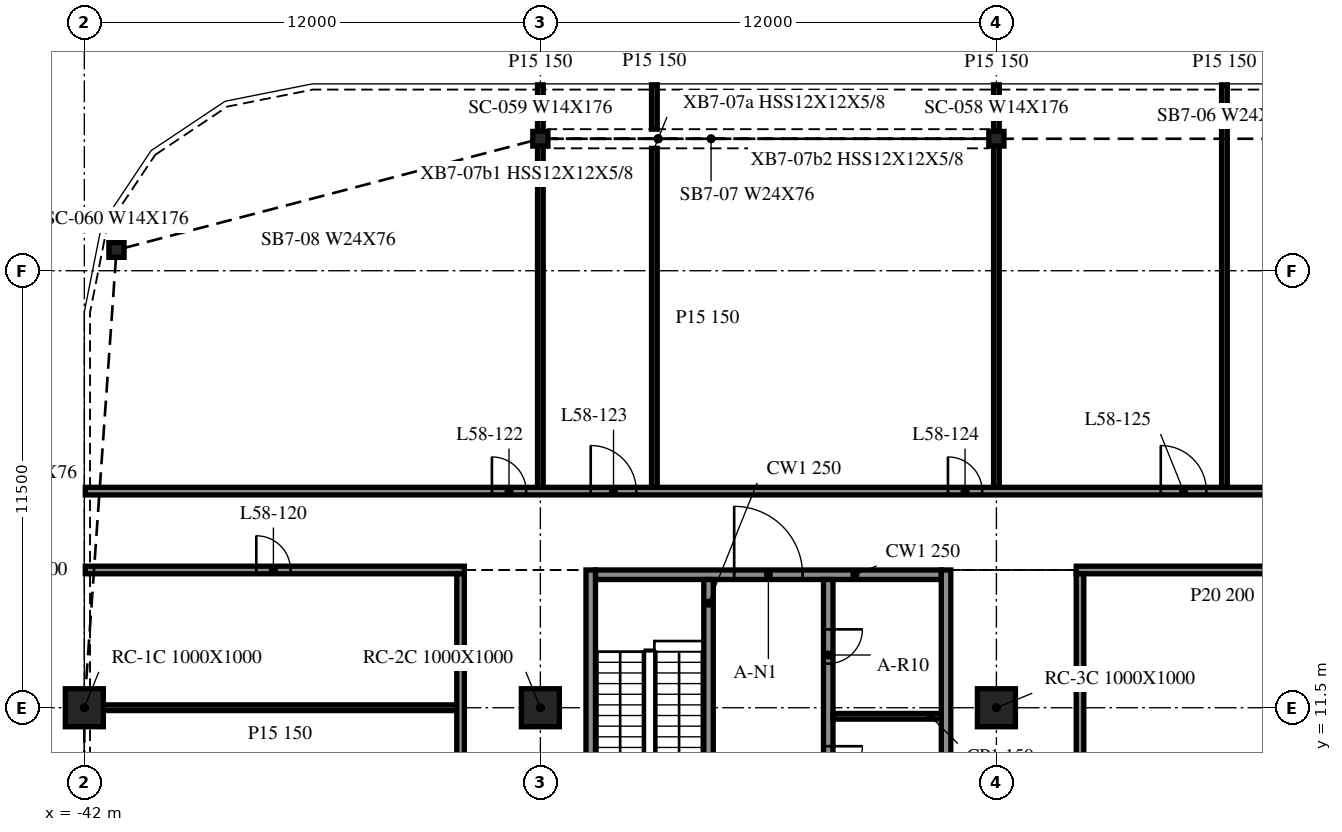
"""IFC4 building model, lengths in metres.
Left out: names, types, materials, properties, quantities, classifications, styles, units other than length and angle.
Written with IfcOpenShell. Run it as: python <this file> out.ifc"""

import sys

from ifc_helpers import new_model, si_unit, direction, frame, frame_2d, origin, origin_2d, place, context, subcontext, project, spatial, rectangle, i_section, extrude, element, fill, save


model = new_model("IFC4")
c1 = context("Model", 3, precision=1e-05, world=origin(), true_north=direction((0.0, 1.0)))
c2 = subcontext(c1, "Body", "Model", "MODEL_VIEW")
j1 = project(units=[si_unit("LENGTHUNIT", "METRE"), si_unit("PLANEANGLEUNIT", "RADIAN")], contexts=[c1])
p1 = place(None, origin())
s1 = spatial("IfcSite", under=j1, at=p1, CompositionType="ELEMENT")
p2 = place(p1, origin())
s2 = spatial("IfcBuilding", under=s1, at=p2, CompositionType="ELEMENT")
p3 = place(p2, frame((0.0, 0.0, 240.0)))
s3 = spatial("IfcBuildingStorey", under=s2, at=p3, CompositionType="ELEMENT", Elevation=240.0)
for number, where, z_axis, x_axis in (
    (1, (-42.0, 11.5, -0.34), (0.0, 0.0, 1.0), (1.0, 0.0, 0.0)),
    (2, (-30.0, 11.5, -0.34), (0.0, 0.0, 1.0), (1.0, 0.0, 0.0)),
    (3, (-18.0, 11.5, -0.34), (0.0, 0.0, 1.0), (1.0, 0.0, 0.0)),
):
    element("IfcColumn", number, at=place(p3, frame(where, z_axis=z_axis, x_axis=x_axis)), inside=s3, PredefinedType="COLUMN", context=c2, shape_type="SweptSolid", body=[
        extrude(rectangle(XDim=1.0, YDim=1.0, at=origin_2d()), origin(), (0.0, 0.0, 1.0), 3.8),
    ])
for number, where, z_axis, x_axis in (
    (4, (-18.0, 26.473, -0.34), (0.0, 0.0, 1.0), (1.0, 0.0, 0.0)),
    (5, (-30.0, 26.473, -0.34), (0.0, 0.0, 1.0), (1.0, 0.0, 0.0)),
    (6, (-41.154, 23.546, -0.34), (0.0, 0.0, 1.0), (1.0, 0.0, 0.0)),
):
    element("IfcColumn", number, at=place(p3, frame(where, z_axis=z_axis, x_axis=x_axis)), inside=s3, PredefinedType="COLUMN", context=c2, shape_type="SweptSolid", body=[
        extrude(i_section(OverallWidth=0.399, OverallDepth=0.386, WebThickness=0.021, FlangeThickness=0.033, at=origin_2d()), origin(), (0.0, 0.0, 1.0), 3.8),
    ])
for number, where, z_axis, x_axis in (
    (7, (-28.675, 15.125, 0.0), (0.0, 0.0, 1.0), (0.0, -1.0, 0.0)),
    (8, (-19.325, -9.125, 0.0), (0.0, 0.0, 1.0), (0.0, 1.0, 0.0)),
):
    element("IfcWall", number, at=place(p3, frame(where, z_axis=z_axis, x_axis=x_axis)), inside=s3, PredefinedType="SOLIDWALL", context=c2, shape_type="SweptSolid", body=[
        extrude(rectangle(XDim=24.25, YDim=0.25, at=frame_2d((12.125, 0.0))), origin(), (0.0, 0.0, 1.0), 3.46),
    ])
p4 = place(p3, frame((-28.55, 15.0, 0.0), z_axis=(0.0, 0.0, 1.0), x_axis=(1.0, 0.0, 0.0)))
e9 = element("IfcWall", 9, at=p4, inside=s3, PredefinedType="SOLIDWALL", context=c2, shape_type="SweptSolid", body=[
    extrude(rectangle(XDim=9.1, YDim=0.25, at=frame_2d((4.55, 0.0))), origin(), (0.0, 0.0, 1.0), 3.46),
])
p5 = place(p4, frame((3.65, 0.0, 0.0)))
e10 = element("IfcOpeningElement", 10, at=p5, cuts=e9, PredefinedType="OPENING", context=c2, shape_type="SweptSolid", body=[
    extrude(rectangle(XDim=1.8, YDim=2.1, at=frame_2d((0.9, 1.05))), frame((0.0, 0.135, 0.0), z_axis=(0.0, -1.0, 0.0), x_axis=(1.0, 0.0, 0.0)), (0.0, 0.0, 1.0), 0.27),
])
p6 = place(p3, frame((-25.575, 14.875, 0.0), z_axis=(0.0, 0.0, 1.0), x_axis=(0.0, -1.0, 0.0)))
e11 = element("IfcWall", 11, at=p6, inside=s3, PredefinedType="SOLIDWALL", context=c2, shape_type="SweptSolid", body=[
    extrude(rectangle(XDim=6.25, YDim=0.25, at=frame_2d((3.125, 0.0))), origin(), (0.0, 0.0, 1.0), 3.46),
])
p7 = place(p6, frame((4.85, 0.0, 0.0)))
e12 = element("IfcOpeningElement", 12, at=p7, cuts=e11, PredefinedType="OPENING", context=c2, shape_type="SweptSolid", body=[
    extrude(rectangle(XDim=1.0, YDim=2.1, at=frame_2d((0.5, 1.05))), frame((0.0, 0.135, 0.0), z_axis=(0.0, -1.0, 0.0), x_axis=(1.0, 0.0, 0.0)), (0.0, 0.0, 1.0), 0.27),
])
p8 = place(p3, frame((-22.425, 14.875, 0.0), z_axis=(0.0, 0.0, 1.0), x_axis=(0.0, -1.0, 0.0)))
e13 = element("IfcWall", 13, at=p8, inside=s3, PredefinedType="SOLIDWALL", context=c2, shape_type="SweptSolid", body=[
    extrude(rectangle(XDim=23.75, YDim=0.25, at=frame_2d((11.875, 0.0))), origin(), (0.0, 0.0, 1.0), 3.46),
])
p9 = place(p8, frame((11.425, 0.0, 0.0)))
e14 = element("IfcOpeningElement", 14, at=p9, cuts=e13, PredefinedType="OPENING", context=c2, shape_type="SweptSolid", body=[
    extrude(rectangle(XDim=0.9, YDim=2.1, at=frame_2d((0.45, 1.05))), frame((0.0, 0.135, 0.0), z_axis=(0.0, -1.0, 0.0), x_axis=(1.0, 0.0, 0.0)), (0.0, 0.0, 1.0), 0.27),
])
p10 = place(p8, frame((21.337, 0.0, 0.0)))
e15 = element("IfcOpeningElement", 15, at=p10, cuts=e13, PredefinedType="OPENING", context=c2, shape_type="SweptSolid", body=[
    extrude(rectangle(XDim=0.9, YDim=2.1, at=frame_2d((0.45, 1.05))), frame((0.0, 0.135, 0.0), z_axis=(0.0, -1.0, 0.0), x_axis=(1.0, 0.0, 0.0)), (0.0, 0.0, 1.0), 0.27),
])
p11 = place(p8, frame((18.262, 0.0, 0.0)))
e16 = element("IfcOpeningElement", 16, at=p11, cuts=e13, PredefinedType="OPENING", context=c2, shape_type="SweptSolid", body=[
    extrude(rectangle(XDim=0.9, YDim=2.1, at=frame_2d((0.45, 1.05))), frame((0.0, 0.135, 0.0), z_axis=(0.0, -1.0, 0.0), x_axis=(1.0, 0.0, 0.0)), (0.0, 0.0, 1.0), 0.27),
])
p12 = place(p8, frame((4.387, 0.0, 0.0)))
e17 = element("IfcOpeningElement", 17, at=p12, cuts=e13, PredefinedType="OPENING", context=c2, shape_type="SweptSolid", body=[
    extrude(rectangle(XDim=0.9, YDim=2.1, at=frame_2d((0.45, 1.05))), frame((0.0, 0.135, 0.0), z_axis=(0.0, -1.0, 0.0), x_axis=(1.0, 0.0, 0.0)), (0.0, 0.0, 1.0), 0.27),
])
p13 = place(p8, frame((1.312, 0.0, 0.0)))
e18 = element("IfcOpeningElement", 18, at=p13, cuts=e13, PredefinedType="OPENING", context=c2, shape_type="SweptSolid", body=[
    extrude(rectangle(XDim=0.9, YDim=2.1, at=frame_2d((0.45, 1.05))), frame((0.0, 0.135, 0.0), z_axis=(0.0, -1.0, 0.0), x_axis=(1.0, 0.0, 0.0)), (0.0, 0.0, 1.0), 0.27),
])
p14 = place(p3, frame((-22.3, 11.275, 0.0), z_axis=(0.0, 0.0, 1.0), x_axis=(1.0, 0.0, 0.0)))
e19 = element("IfcWall", 19, at=p14, inside=s3, PredefinedType="PARTITIONING", context=c2, shape_type="SweptSolid", body=[
    extrude(rectangle(XDim=2.85, YDim=0.15, at=frame_2d((1.425, 0.0))), origin(), (0.0, 0.0, 1.0), 3.46),
])
p15 = place(p3, frame((-41.5, 11.5, 0.0), z_axis=(0.0, 0.0, 1.0), x_axis=(1.0, 0.0, 0.0)))
e20 = element("IfcWall", 20, at=p15, inside=s3, PredefinedType="PARTITIONING", context=c2, shape_type="SweptSolid", body=[
    extrude(rectangle(XDim=9.3, YDim=0.15, at=frame_2d((4.65, 0.0))), origin(), (0.0, 0.0, 1.0), 3.46),
])
p16 = place(p3, frame((-41.975, 15.125, 0.0), z_axis=(0.0, 0.0, 1.0), x_axis=(1.0, 0.0, 0.0)))
e21 = element("IfcWall", 21, at=p16, inside=s3, PredefinedType="PARTITIONING", context=c2, shape_type="SweptSolid", body=[
    extrude(rectangle(XDim=9.975, YDim=0.2, at=frame_2d((4.988, 0.0))), origin(), (0.0, 0.0, 1.0), 3.46),
])
p17 = place(p16, frame((4.5, 0.0, 0.0)))
e22 = element("IfcOpeningElement", 22, at=p17, cuts=e21, PredefinedType="OPENING", context=c2, shape_type="SweptSolid", body=[
    extrude(rectangle(XDim=0.9, YDim=2.1, at=frame_2d((0.45, 1.05))), frame((0.0, 0.11, 0.0), z_axis=(0.0, -1.0, 0.0), x_axis=(1.0, 0.0, 0.0)), (0.0, 0.0, 1.0), 0.22),
])
p18 = place(p3, frame((-15.9, 15.125, 0.0), z_axis=(0.0, 0.0, 1.0), x_axis=(1.0, 0.0, 0.0)))
e23 = element("IfcWall", 23, at=p18, inside=s3, PredefinedType="PARTITIONING", context=c2, shape_type="SweptSolid", body=[
    extrude(rectangle(XDim=7.7, YDim=0.2, at=frame_2d((3.85, 0.0))), origin(), (0.0, 0.0, 1.0), 3.46),
])
p19 = place(p3, frame((-41.975, 17.2, 0.0), z_axis=(0.0, 0.0, 1.0), x_axis=(1.0, 0.0, 0.0)))
e24 = element("IfcWall", 24, at=p19, inside=s3, PredefinedType="PARTITIONING", context=c2, shape_type="SweptSolid", body=[
    extrude(rectangle(XDim=95.95, YDim=0.2, at=frame_2d((47.975, 0.0))), origin(), (0.0, 0.0, 1.0), 3.46),
])
p20 = place(p19, frame((10.7, 0.0, 0.0)))
e25 = element("IfcOpeningElement", 25, at=p20, cuts=e24, PredefinedType="OPENING", context=c2, shape_type="SweptSolid", body=[
    extrude(rectangle(XDim=0.9, YDim=2.1, at=frame_2d((0.45, 1.05))), frame((0.0, 0.11, 0.0), z_axis=(0.0, -1.0, 0.0), x_axis=(1.0, 0.0, 0.0)), (0.0, 0.0, 1.0), 0.22),
])
p21 = place(p19, frame((13.3, 0.0, 0.0)))
e26 = element("IfcOpeningElement", 26, at=p21, cuts=e24, PredefinedType="OPENING", context=c2, shape_type="SweptSolid", body=[
    extrude(rectangle(XDim=1.2, YDim=2.1, at=frame_2d((0.6, 1.05))), frame((0.0, 0.11, 0.0), z_axis=(0.0, -1.0, 0.0), x_axis=(1.0, 0.0, 0.0)), (0.0, 0.0, 1.0), 0.22),
])
p22 = place(p19, frame((22.7, 0.0, 0.0)))
e27 = element("IfcOpeningElement", 27, at=p22, cuts=e24, PredefinedType="OPENING", context=c2, shape_type="SweptSolid", body=[
    extrude(rectangle(XDim=0.9, YDim=2.1, at=frame_2d((0.45, 1.05))), frame((0.0, 0.11, 0.0), z_axis=(0.0, -1.0, 0.0), x_axis=(1.0, 0.0, 0.0)), (0.0, 0.0, 1.0), 0.22),
])
p23 = place(p19, frame((28.3, 0.0, 0.0)))
e28 = element("IfcOpeningElement", 28, at=p23, cuts=e24, PredefinedType="OPENING", context=c2, shape_type="SweptSolid", body=[
    extrude(rectangle(XDim=1.2, YDim=2.1, at=frame_2d((0.6, 1.05))), frame((0.0, 0.11, 0.0), z_axis=(0.0, -1.0, 0.0), x_axis=(1.0, 0.0, 0.0)), (0.0, 0.0, 1.0), 0.22),
])
p24 = place(p19, frame((40.3, 0.0, 0.0)))
e29 = element("IfcOpeningElement", 29, at=p24, cuts=e24, PredefinedType="OPENING", context=c2, shape_type="SweptSolid", body=[
    extrude(rectangle(XDim=1.2, YDim=2.1, at=frame_2d((0.6, 1.05))), frame((0.0, 0.11, 0.0), z_axis=(0.0, -1.0, 0.0), x_axis=(1.0, 0.0, 0.0)), (0.0, 0.0, 1.0), 0.22),
])
p25 = place(p19, frame((43.7, 0.0, 0.0)))
e30 = element("IfcOpeningElement", 30, at=p25, cuts=e24, PredefinedType="OPENING", context=c2, shape_type="SweptSolid", body=[
    extrude(rectangle(XDim=0.9, YDim=2.1, at=frame_2d((0.45, 1.05))), frame((0.0, 0.11, 0.0), z_axis=(0.0, -1.0, 0.0), x_axis=(1.0, 0.0, 0.0)), (0.0, 0.0, 1.0), 0.22),
])
p26 = place(p19, frame((47.3, 0.0, 0.0)))
e31 = element("IfcOpeningElement", 31, at=p26, cuts=e24, PredefinedType="OPENING", context=c2, shape_type="SweptSolid", body=[
    extrude(rectangle(XDim=1.2, YDim=2.1, at=frame_2d((0.6, 1.05))), frame((0.0, 0.11, 0.0), z_axis=(0.0, -1.0, 0.0), x_axis=(1.0, 0.0, 0.0)), (0.0, 0.0, 1.0), 0.22),
])
p27 = place(p19, frame((54.1, 0.0, 0.0)))
e32 = element("IfcOpeningElement", 32, at=p27, cuts=e24, PredefinedType="OPENING", context=c2, shape_type="SweptSolid", body=[
    extrude(rectangle(XDim=0.9, YDim=2.1, at=frame_2d((0.45, 1.05))), frame((0.0, 0.11, 0.0), z_axis=(0.0, -1.0, 0.0), x_axis=(1.0, 0.0, 0.0)), (0.0, 0.0, 1.0), 0.22),
])
p28 = place(p19, frame((60.1, 0.0, 0.0)))
e33 = element("IfcOpeningElement", 33, at=p28, cuts=e24, PredefinedType="OPENING", context=c2, shape_type="SweptSolid", body=[
    extrude(rectangle(XDim=1.2, YDim=2.1, at=frame_2d((0.6, 1.05))), frame((0.0, 0.11, 0.0), z_axis=(0.0, -1.0, 0.0), x_axis=(1.0, 0.0, 0.0)), (0.0, 0.0, 1.0), 0.22),
])
p29 = place(p19, frame((72.1, 0.0, 0.0)))
e34 = element("IfcOpeningElement", 34, at=p29, cuts=e24, PredefinedType="OPENING", context=c2, shape_type="SweptSolid", body=[
    extrude(rectangle(XDim=1.2, YDim=2.1, at=frame_2d((0.6, 1.05))), frame((0.0, 0.11, 0.0), z_axis=(0.0, -1.0, 0.0), x_axis=(1.0, 0.0, 0.0)), (0.0, 0.0, 1.0), 0.22),
])
p30 = place(p19, frame((75.1, 0.0, 0.0)))
e35 = element("IfcOpeningElement", 35, at=p30, cuts=e24, PredefinedType="OPENING", context=c2, shape_type="SweptSolid", body=[
    extrude(rectangle(XDim=0.9, YDim=2.1, at=frame_2d((0.45, 1.05))), frame((0.0, 0.11, 0.0), z_axis=(0.0, -1.0, 0.0), x_axis=(1.0, 0.0, 0.0)), (0.0, 0.0, 1.0), 0.22),
])
p31 = place(p19, frame((84.1, 0.0, 0.0)))
e36 = element("IfcOpeningElement", 36, at=p31, cuts=e24, PredefinedType="OPENING", context=c2, shape_type="SweptSolid", body=[
    extrude(rectangle(XDim=1.2, YDim=2.1, at=frame_2d((0.6, 1.05))), frame((0.0, 0.11, 0.0), z_axis=(0.0, -1.0, 0.0), x_axis=(1.0, 0.0, 0.0)), (0.0, 0.0, 1.0), 0.22),
])
p32 = place(p19, frame((90.1, 0.0, 0.0)))
e37 = element("IfcOpeningElement", 37, at=p32, cuts=e24, PredefinedType="OPENING", context=c2, shape_type="SweptSolid", body=[
    extrude(rectangle(XDim=0.9, YDim=2.1, at=frame_2d((0.45, 1.05))), frame((0.0, 0.11, 0.0), z_axis=(0.0, -1.0, 0.0), x_axis=(1.0, 0.0, 0.0)), (0.0, 0.0, 1.0), 0.22),
])
p33 = place(p3, frame((-32.1, -9.025, 0.0), z_axis=(0.0, 0.0, 1.0), x_axis=(0.0, 1.0, 0.0)))
e38 = element("IfcWall", 38, at=p33, inside=s3, PredefinedType="PARTITIONING", context=c2, shape_type="SweptSolid", body=[
    extrude(rectangle(XDim=24.05, YDim=0.2, at=frame_2d((12.025, 0.0))), origin(), (0.0, 0.0, 1.0), 3.46),
])
p34 = place(p33, frame((11.5, 0.0, 0.0)))
e39 = element("IfcOpeningElement", 39, at=p34, cuts=e38, PredefinedType="OPENING", context=c2, shape_type="SweptSolid", body=[
    extrude(rectangle(XDim=1.0, YDim=2.1, at=frame_2d((0.5, 1.05))), frame((0.0, 0.11, 0.0), z_axis=(0.0, -1.0, 0.0), x_axis=(1.0, 0.0, 0.0)), (0.0, 0.0, 1.0), 0.22),
])
p35 = place(p3, frame((-30.0, 17.3, 0.0), z_axis=(0.0, 0.0, 1.0), x_axis=(0.0, 1.0, 0.0)))
e40 = element("IfcWall", 40, at=p35, inside=s3, PredefinedType="PARTITIONING", context=c2, shape_type="SweptSolid", body=[
    extrude(rectangle(XDim=10.592, YDim=0.15, at=frame_2d((5.296, 0.0))), origin(), (0.0, 0.0, 1.0), 3.46),
])
p36 = place(p3, frame((-27.0, 17.3, 0.0), z_axis=(0.0, 0.0, 1.0), x_axis=(0.0, 1.0, 0.0)))
e41 = element("IfcWall", 41, at=p36, inside=s3, PredefinedType="PARTITIONING", context=c2, shape_type="SweptSolid", body=[
    extrude(rectangle(XDim=8.921, YDim=0.15, at=frame_2d((4.46, 0.0))), origin(), (0.0, 0.0, 1.0), 3.46),
])
p37 = place(p3, frame((-27.0, 26.725, 0.0), z_axis=(0.0, 0.0, 1.0), x_axis=(0.0, 1.0, 0.0)))
e42 = element("IfcWall", 42, at=p37, inside=s3, PredefinedType="PARTITIONING", context=c2, shape_type="SweptSolid", body=[
    extrude(rectangle(XDim=1.167, YDim=0.15, at=frame_2d((0.583, 0.0))), origin(), (0.0, 0.0, 1.0), 3.46),
])
p38 = place(p3, frame((-18.0, 17.3, 0.0), z_axis=(0.0, 0.0, 1.0), x_axis=(0.0, 1.0, 0.0)))
e43 = element("IfcWall", 43, at=p38, inside=s3, PredefinedType="PARTITIONING", context=c2, shape_type="SweptSolid", body=[
    extrude(rectangle(XDim=10.592, YDim=0.15, at=frame_2d((5.296, 0.0))), origin(), (0.0, 0.0, 1.0), 3.46),
])
p39 = place(p3, frame((-15.8, -9.025, 0.0), z_axis=(0.0, 0.0, 1.0), x_axis=(0.0, 1.0, 0.0)))
e44 = element("IfcWall", 44, at=p39, inside=s3, PredefinedType="PARTITIONING", context=c2, shape_type="SweptSolid", body=[
    extrude(rectangle(XDim=24.05, YDim=0.2, at=frame_2d((12.025, 0.0))), origin(), (0.0, 0.0, 1.0), 3.46),
])
p40 = place(p39, frame((11.5, 0.0, 0.0)))
e45 = element("IfcOpeningElement", 45, at=p40, cuts=e44, PredefinedType="OPENING", context=c2, shape_type="SweptSolid", body=[
    extrude(rectangle(XDim=0.9, YDim=2.1, at=frame_2d((0.45, 1.05))), frame((0.0, 0.11, 0.0), z_axis=(0.0, -1.0, 0.0), x_axis=(1.0, 0.0, 0.0)), (0.0, 0.0, 1.0), 0.22),
])
p41 = place(p3, frame((-12.0, 17.3, 0.0), z_axis=(0.0, 0.0, 1.0), x_axis=(0.0, 1.0, 0.0)))
e46 = element("IfcWall", 46, at=p41, inside=s3, PredefinedType="PARTITIONING", context=c2, shape_type="SweptSolid", body=[
    extrude(rectangle(XDim=10.592, YDim=0.15, at=frame_2d((5.296, 0.0))), origin(), (0.0, 0.0, 1.0), 3.46),
])
p42 = place(p5, origin())
e47 = element("IfcDoor", 47, at=p42, inside=s3, OperationType="DOUBLE_DOOR_SINGLE_SWING", PredefinedType="DOOR", context=c2, shape_type="SweptSolid", body=[
    extrude(rectangle(XDim=1.8, YDim=2.1, at=frame_2d((0.9, 1.05))), frame((0.0, 0.025, 0.0), z_axis=(0.0, -1.0, 0.0), x_axis=(1.0, 0.0, 0.0)), (0.0, 0.0, 1.0), 0.05),
])
fill(e10, e47)
p43 = place(p12, origin())
e48 = element("IfcDoor", 48, at=p43, inside=s3, OperationType="SINGLE_SWING_LEFT", PredefinedType="DOOR", context=c2, shape_type="SweptSolid", body=[
    extrude(rectangle(XDim=0.9, YDim=2.1, at=frame_2d((0.45, 1.05))), frame((0.0, 0.025, 0.0), z_axis=(0.0, -1.0, 0.0), x_axis=(1.0, 0.0, 0.0)), (0.0, 0.0, 1.0), 0.05),
])
fill(e17, e48)
p44 = place(p13, origin())
e49 = element("IfcDoor", 49, at=p44, inside=s3, OperationType="SINGLE_SWING_RIGHT", PredefinedType="DOOR", context=c2, shape_type="SweptSolid", body=[
    extrude(rectangle(XDim=0.9, YDim=2.1, at=frame_2d((0.45, 1.05))), frame((0.0, 0.025, 0.0), z_axis=(0.0, -1.0, 0.0), x_axis=(1.0, 0.0, 0.0)), (0.0, 0.0, 1.0), 0.05),
])
fill(e18, e49)
p45 = place(p17, origin())
e50 = element("IfcDoor", 50, at=p45, inside=s3, OperationType="SINGLE_SWING_LEFT", PredefinedType="DOOR", context=c2, shape_type="SweptSolid", body=[
    extrude(rectangle(XDim=0.9, YDim=2.1, at=frame_2d((0.45, 1.05))), frame((0.0, 0.025, 0.0), z_axis=(0.0, -1.0, 0.0), x_axis=(1.0, 0.0, 0.0)), (0.0, 0.0, 1.0), 0.05),
])
fill(e22, e50)
p46 = place(p20, origin())
e51 = element("IfcDoor", 51, at=p46, inside=s3, OperationType="SINGLE_SWING_LEFT", PredefinedType="DOOR", context=c2, shape_type="SweptSolid", body=[
    extrude(rectangle(XDim=0.9, YDim=2.1, at=frame_2d((0.45, 1.05))), frame((0.0, 0.025, 0.0), z_axis=(0.0, -1.0, 0.0), x_axis=(1.0, 0.0, 0.0)), (0.0, 0.0, 1.0), 0.05),
])
fill(e25, e51)
p47 = place(p21, origin())
e52 = element("IfcDoor", 52, at=p47, inside=s3, OperationType="SINGLE_SWING_LEFT", PredefinedType="DOOR", context=c2, shape_type="SweptSolid", body=[
    extrude(rectangle(XDim=1.2, YDim=2.1, at=frame_2d((0.6, 1.05))), frame((0.0, 0.025, 0.0), z_axis=(0.0, -1.0, 0.0), x_axis=(1.0, 0.0, 0.0)), (0.0, 0.0, 1.0), 0.05),
])
fill(e26, e52)
p48 = place(p22, origin())
e53 = element("IfcDoor", 53, at=p48, inside=s3, OperationType="SINGLE_SWING_LEFT", PredefinedType="DOOR", context=c2, shape_type="SweptSolid", body=[
    extrude(rectangle(XDim=0.9, YDim=2.1, at=frame_2d((0.45, 1.05))), frame((0.0, 0.025, 0.0), z_axis=(0.0, -1.0, 0.0), x_axis=(1.0, 0.0, 0.0)), (0.0, 0.0, 1.0), 0.05),
])
fill(e27, e53)
p49 = place(p23, origin())
e54 = element("IfcDoor", 54, at=p49, inside=s3, OperationType="SINGLE_SWING_LEFT", PredefinedType="DOOR", context=c2, shape_type="SweptSolid", body=[
    extrude(rectangle(XDim=1.2, YDim=2.1, at=frame_2d((0.6, 1.05))), frame((0.0, 0.025, 0.0), z_axis=(0.0, -1.0, 0.0), x_axis=(1.0, 0.0, 0.0)), (0.0, 0.0, 1.0), 0.05),
])
fill(e28, e54)
save(model, sys.argv[1])
